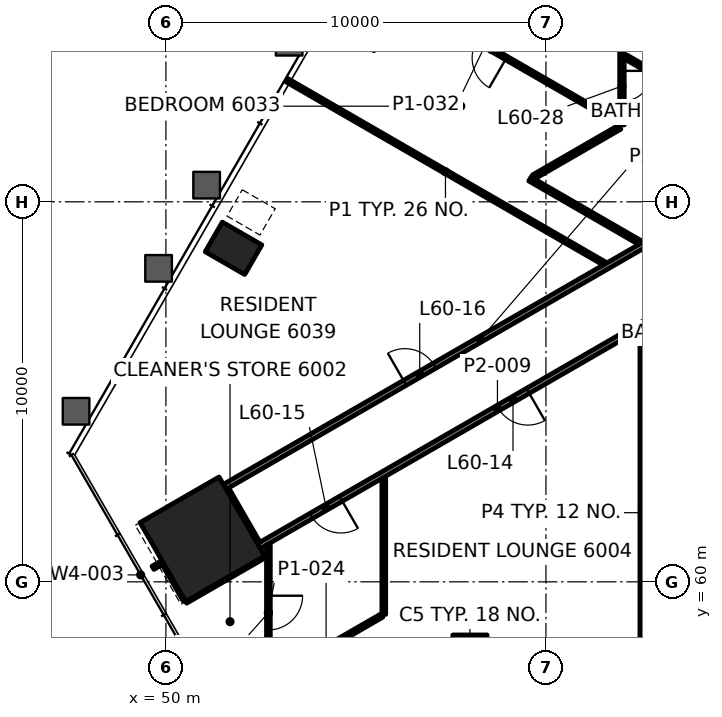
"""IFC4 building model, lengths in metres.
Left out: names, types, materials, properties, quantities, classifications, styles, units other than length and angle.
Written with IfcOpenShell. Run it as: python <this file> out.ifc"""

import sys

from ifc_helpers import new_model, si_unit, direction, frame, frame_2d, origin, origin_2d, place, context, subcontext, project, spatial, rectangle, hollow_rectangle, extrude, element, fill, save


model = new_model("IFC4")
c1 = context("Model", 3, precision=1e-05, world=origin(), true_north=direction((0.0, 1.0)))
c2 = subcontext(c1, "Body", "Model", "MODEL_VIEW")
j1 = project(units=[si_unit("LENGTHUNIT", "METRE"), si_unit("PLANEANGLEUNIT", "RADIAN")], contexts=[c1])
p1 = place(None, origin())
s1 = spatial("IfcSite", under=j1, at=p1, CompositionType="ELEMENT")
p2 = place(p1, origin())
s2 = spatial("IfcBuilding", under=s1, at=p2, CompositionType="ELEMENT")
p3 = place(p2, frame((0.0, 0.0, 256.6)))
s3 = spatial("IfcBuildingStorey", under=s2, at=p3, CompositionType="ELEMENT", Elevation=256.6)
p4 = place(p3, frame((50.959, 61.12, 0.0), z_axis=(0.0, 0.0, 1.0), x_axis=(0.5, -0.866025403784, 0.0)))
e1 = element("IfcColumn", 1, at=p4, inside=s3, PredefinedType="COLUMN", context=c2, shape_type="SweptSolid", body=[
    extrude(rectangle(XDim=2.4, YDim=2.4, at=origin_2d()), origin(), (0.0, 0.0, 1.0), 3.5),
])
for number, where, z_axis, x_axis in (
    (2, (58.0, 58.002, -0.0), (0.0, 0.0, 1.0), (1.0, 0.0, 0.0)),
    (3, (51.78, 68.777, -0.0), (0.0, 0.0, 1.0), (-0.5, -0.866, 0.0)),
):
    element("IfcColumn", number, at=place(p3, frame(where, z_axis=z_axis, x_axis=x_axis)), inside=s3, PredefinedType="COLUMN", context=c2, shape_type="SweptSolid", body=[
        extrude(hollow_rectangle(XDim=0.9, YDim=1.2, WallThickness=0.06, at=origin_2d()), origin(), (0.0, 0.0, 1.0), 3.5),
    ])
p5 = place(p3, frame((52.779, 57.437, 0.0), z_axis=(0.0, 0.0, 1.0), x_axis=(0.866038859646, 0.49997669304, 0.0)))
e4 = element("IfcWall", 4, at=p5, inside=s3, PredefinedType="PARTITIONING", context=c2, shape_type="SweptSolid", body=[
    extrude(rectangle(XDim=3.353, YDim=0.1, at=frame_2d((1.676, 0.0))), origin(), (0.0, 0.0, 1.0), 2.7),
])
p6 = place(p3, frame((50.52, 59.481, 0.0), z_axis=(0.0, 0.0, 1.0), x_axis=(0.866036455013, 0.499980858223, 0.0)))
e5 = element("IfcWall", 5, at=p6, inside=s3, PredefinedType="PARTITIONING", context=c2, shape_type="SweptSolid", body=[
    extrude(rectangle(XDim=2.399, YDim=0.1, at=frame_2d((1.199, 0.0))), origin(), (0.0, 0.0, 1.0), 2.7),
])
p7 = place(p3, frame((65.0, 68.187, 0.0), z_axis=(0.0, 0.0, 1.0), x_axis=(-0.866027660432, -0.499996091351, 0.0)))
e6 = element("IfcWall", 6, at=p7, inside=s3, PredefinedType="PARTITIONING", context=c2, shape_type="SweptSolid", body=[
    extrude(rectangle(XDim=14.494, YDim=0.15, at=frame_2d((7.247, 0.0))), origin(), (0.0, 0.0, 1.0), 2.547),
])
p8 = place(p7, frame((6.324, 0.0, 0.0)))
e7 = element("IfcOpeningElement", 7, at=p8, cuts=e6, PredefinedType="OPENING", context=c2, shape_type="SweptSolid", body=[
    extrude(rectangle(XDim=0.9, YDim=2.1, at=frame_2d((0.45, 1.05))), frame((0.0, 0.085, 0.0), z_axis=(0.0, -1.0, 0.0), x_axis=(1.0, 0.0, 0.0)), (0.0, 0.0, 1.0), 0.17),
])
p9 = place(p7, frame((12.004, 0.0, 0.0)))
e8 = element("IfcOpeningElement", 8, at=p9, cuts=e6, PredefinedType="OPENING", context=c2, shape_type="SweptSolid", body=[
    extrude(rectangle(XDim=0.9, YDim=2.1, at=frame_2d((0.45, 1.05))), frame((0.0, 0.085, 0.0), z_axis=(0.0, -1.0, 0.0), x_axis=(1.0, 0.0, 0.0)), (0.0, 0.0, 1.0), 0.17),
])
p10 = place(p3, frame((49.66, 60.37, 0.0), z_axis=(0.0, 0.0, 1.0), x_axis=(0.866006330792, 0.500033033937, 0.0)))
e9 = element("IfcWall", 9, at=p10, inside=s3, PredefinedType="PARTITIONING", context=c2, shape_type="SweptSolid", body=[
    extrude(rectangle(XDim=0.25, YDim=0.1, at=frame_2d((0.125, 0.0))), origin(), (0.0, 0.0, 1.0), 2.7),
])
p11 = place(p3, frame((51.549, 62.5, 0.0), z_axis=(0.0, 0.0, 1.0), x_axis=(0.866020420161, 0.50000863179, 0.0)))
e10 = element("IfcWall", 10, at=p11, inside=s3, PredefinedType="PARTITIONING", context=c2, shape_type="SweptSolid", body=[
    extrude(rectangle(XDim=15.532, YDim=0.15, at=frame_2d((7.766, 0.0))), origin(), (0.0, 0.0, 1.0), 2.7),
])
p12 = place(p11, frame((5.474, 0.0, 0.0)))
e11 = element("IfcOpeningElement", 11, at=p12, cuts=e10, PredefinedType="OPENING", context=c2, shape_type="SweptSolid", body=[
    extrude(rectangle(XDim=0.9, YDim=2.1, at=frame_2d((0.45, 1.05))), frame((0.0, 0.085, 0.0), z_axis=(0.0, -1.0, 0.0), x_axis=(1.0, 0.0, 0.0)), (0.0, 0.0, 1.0), 0.17),
])
p13 = place(p3, frame((59.673, 70.655, 0.0), z_axis=(0.0, 0.0, 1.0), x_axis=(0.866053563643, 0.499951222523, 0.0)))
e12 = element("IfcWall", 12, at=p13, inside=s3, PredefinedType="PARTITIONING", context=c2, shape_type="SweptSolid", body=[
    extrude(rectangle(XDim=2.617, YDim=0.12, at=frame_2d((1.309, 0.0))), origin(), (0.0, 0.0, 1.0), 2.7),
])
p14 = place(p3, frame((62.533, 57.002, 0.0), z_axis=(0.0, 0.0, 1.0), x_axis=(0.0, 1.0, 0.0)))
e13 = element("IfcWall", 13, at=p14, inside=s3, PredefinedType="PARTITIONING", context=c2, shape_type="SweptSolid", body=[
    extrude(rectangle(XDim=9.634, YDim=0.12, at=frame_2d((4.817, 0.0))), origin(), (0.0, 0.0, 1.0), 2.547),
])
p15 = place(p3, frame((62.0, 85.912, 0.0), z_axis=(0.0, 0.0, 1.0), x_axis=(0.0, -1.0, 0.0)))
e14 = element("IfcWall", 14, at=p15, inside=s3, PredefinedType="PARTITIONING", context=c2, shape_type="SweptSolid", body=[
    extrude(rectangle(XDim=13.888, YDim=0.12, at=frame_2d((6.944, 0.0))), origin(), (0.0, 0.0, 1.0), 2.7),
])
p16 = place(p15, frame((1.224, 0.0, 0.0)))
e15 = element("IfcOpeningElement", 15, at=p16, cuts=e14, PredefinedType="OPENING", context=c2, shape_type="SweptSolid", body=[
    extrude(rectangle(XDim=0.9, YDim=2.1, at=frame_2d((0.45, 1.05))), frame((0.0, 0.07, 0.0), z_axis=(0.0, -1.0, 0.0), x_axis=(1.0, 0.0, 0.0)), (0.0, 0.0, 1.0), 0.14),
])
p17 = place(p15, frame((9.49, 0.0, 0.0)))
e16 = element("IfcOpeningElement", 16, at=p17, cuts=e14, PredefinedType="OPENING", context=c2, shape_type="SweptSolid", body=[
    extrude(rectangle(XDim=0.9, YDim=2.1, at=frame_2d((0.45, 1.05))), frame((0.0, 0.07, 0.0), z_axis=(0.0, -1.0, 0.0), x_axis=(1.0, 0.0, 0.0)), (0.0, 0.0, 1.0), 0.14),
])
p18 = place(p15, frame((12.466, 0.0, 0.0)))
e17 = element("IfcOpeningElement", 17, at=p18, cuts=e14, PredefinedType="OPENING", context=c2, shape_type="SweptSolid", body=[
    extrude(rectangle(XDim=0.8, YDim=2.1, at=frame_2d((0.4, 1.05))), frame((0.0, 0.07, 0.0), z_axis=(0.0, -1.0, 0.0), x_axis=(1.0, 0.0, 0.0)), (0.0, 0.0, 1.0), 0.14),
])
p19 = place(p3, frame((55.733, 59.142, 0.0), z_axis=(0.0, 0.0, 1.0), x_axis=(0.0, 1.0, 0.0)))
e18 = element("IfcWall", 18, at=p19, inside=s3, PredefinedType="PARTITIONING", context=c2, shape_type="SweptSolid", body=[
    extrude(rectangle(XDim=3.578, YDim=0.1, at=frame_2d((1.789, 0.0))), origin(), (0.0, 0.0, 1.0), 2.7),
])
p20 = place(p3, frame((52.697, 60.967, 0.0), z_axis=(0.0, 0.0, 1.0), x_axis=(0.0, -1.0, 0.0)))
e19 = element("IfcWall", 19, at=p20, inside=s3, PredefinedType="PARTITIONING", context=c2, shape_type="SweptSolid", body=[
    extrude(rectangle(XDim=3.565, YDim=0.1, at=frame_2d((1.783, 0.0))), origin(), (0.0, 0.0, 1.0), 2.7),
])
p21 = place(p20, frame((1.333, 0.0, 0.0)))
e20 = element("IfcOpeningElement", 20, at=p21, cuts=e19, PredefinedType="OPENING", context=c2, shape_type="SweptSolid", body=[
    extrude(rectangle(XDim=0.9, YDim=2.1, at=frame_2d((0.45, 1.05))), frame((0.0, 0.06, 0.0), z_axis=(0.0, -1.0, 0.0), x_axis=(1.0, 0.0, 0.0)), (0.0, 0.0, 1.0), 0.12),
])
p22 = place(p3, frame((52.408, 61.01, 0.0), z_axis=(0.0, 0.0, 1.0), x_axis=(-0.499988108725, 0.866032269107, 0.0)))
e21 = element("IfcWall", 21, at=p22, inside=s3, PredefinedType="PARTITIONING", context=c2, shape_type="SweptSolid", body=[
    extrude(rectangle(XDim=1.644, YDim=0.15, at=frame_2d((0.822, 0.0))), origin(), (0.0, 0.0, 1.0), 2.547),
])
p23 = place(p3, frame((50.495, 59.525, 0.0), z_axis=(0.0, 0.0, 1.0), x_axis=(-0.50004744102, 0.865998011966, 0.0)))
e22 = element("IfcWall", 22, at=p23, inside=s3, PredefinedType="PARTITIONING", context=c2, shape_type="SweptSolid", body=[
    extrude(rectangle(XDim=1.149, YDim=0.1, at=frame_2d((0.574, 0.0))), origin(), (0.0, 0.0, 1.0), 2.7),
])
p24 = place(p3, frame((64.89, 72.2, 0.0), z_axis=(0.0, 0.0, 1.0), x_axis=(-0.866033195618, 0.499986503906, 0.0)))
e23 = element("IfcWall", 23, at=p24, inside=s3, PredefinedType="PARTITIONING", context=c2, shape_type="SweptSolid", body=[
    extrude(rectangle(XDim=3.228, YDim=0.12, at=frame_2d((1.614, 0.0))), origin(), (0.0, 0.0, 1.0), 2.7),
])
p25 = place(p3, frame((61.914, 72.076, 0.0), z_axis=(0.0, 0.0, 1.0), x_axis=(-0.866023498866, 0.500003299401, 0.0)))
e24 = element("IfcWall", 24, at=p25, inside=s3, PredefinedType="PARTITIONING", context=c2, shape_type="SweptSolid", body=[
    extrude(rectangle(XDim=8.127, YDim=0.1, at=frame_2d((4.063, 0.0))), origin(), (0.0, 0.0, 1.0), 2.688),
])
p26 = place(p25, frame((3.413, 0.0, 0.0)))
e25 = element("IfcOpeningElement", 25, at=p26, cuts=e24, PredefinedType="OPENING", context=c2, shape_type="SweptSolid", body=[
    extrude(rectangle(XDim=0.9, YDim=2.1, at=frame_2d((0.45, 1.05))), frame((0.0, 0.06, 0.0), z_axis=(0.0, -1.0, 0.0), x_axis=(1.0, 0.0, 0.0)), (0.0, 0.0, 1.0), 0.12),
])
p27 = place(p3, frame((62.469, 68.931, 0.0), z_axis=(0.0, 0.0, 1.0), x_axis=(-0.866033317326, 0.499986293093, 0.0)))
e26 = element("IfcWall", 26, at=p27, inside=s3, PredefinedType="PARTITIONING", context=c2, shape_type="SweptSolid", body=[
    extrude(rectangle(XDim=3.337, YDim=0.12, at=frame_2d((1.669, 0.0))), origin(), (0.0, 0.0, 1.0), 2.7),
])
p28 = place(p3, frame((61.532, 68.38, 0.0), z_axis=(0.0, 0.0, 1.0), x_axis=(-0.866022444854, 0.500005124982, 0.0)))
e27 = element("IfcWall", 27, at=p28, inside=s3, PredefinedType="PARTITIONING", context=c2, shape_type="SweptSolid", body=[
    extrude(rectangle(XDim=9.645, YDim=0.1, at=frame_2d((4.822, 0.0))), origin(), (0.0, 0.0, 1.0), 2.7),
])
p29 = place(p8, origin())
e28 = element("IfcDoor", 28, at=p29, inside=s3, OperationType="SINGLE_SWING_RIGHT", PredefinedType="DOOR", context=c2, shape_type="SweptSolid", body=[
    extrude(rectangle(XDim=0.9, YDim=2.1, at=frame_2d((0.45, 1.05))), frame((0.0, 0.025, 0.0), z_axis=(0.0, -1.0, 0.0), x_axis=(1.0, 0.0, 0.0)), (0.0, 0.0, 1.0), 0.05),
])
fill(e7, e28)
p30 = place(p9, origin())
e29 = element("IfcDoor", 29, at=p30, inside=s3, OperationType="SINGLE_SWING_LEFT", PredefinedType="DOOR", context=c2, shape_type="SweptSolid", body=[
    extrude(rectangle(XDim=0.9, YDim=2.1, at=frame_2d((0.45, 1.05))), frame((0.0, 0.025, 0.0), z_axis=(0.0, -1.0, 0.0), x_axis=(1.0, 0.0, 0.0)), (0.0, 0.0, 1.0), 0.05),
])
fill(e8, e29)
p31 = place(p12, origin())
e30 = element("IfcDoor", 30, at=p31, inside=s3, OperationType="SINGLE_SWING_RIGHT", PredefinedType="DOOR", context=c2, shape_type="SweptSolid", body=[
    extrude(rectangle(XDim=0.9, YDim=2.1, at=frame_2d((0.45, 1.05))), frame((0.0, 0.025, 0.0), z_axis=(0.0, -1.0, 0.0), x_axis=(1.0, 0.0, 0.0)), (0.0, 0.0, 1.0), 0.05),
])
fill(e11, e30)
p32 = place(p18, origin())
e31 = element("IfcDoor", 31, at=p32, inside=s3, OperationType="SINGLE_SWING_RIGHT", PredefinedType="DOOR", context=c2, shape_type="SweptSolid", body=[
    extrude(rectangle(XDim=0.8, YDim=2.1, at=frame_2d((0.4, 1.05))), frame((0.0, 0.025, 0.0), z_axis=(0.0, -1.0, 0.0), x_axis=(1.0, 0.0, 0.0)), (0.0, 0.0, 1.0), 0.05),
])
fill(e17, e31)
p33 = place(p21, origin())
e32 = element("IfcDoor", 32, at=p33, inside=s3, OperationType="SINGLE_SWING_RIGHT", PredefinedType="DOOR", context=c2, shape_type="SweptSolid", body=[
    extrude(rectangle(XDim=0.9, YDim=2.1, at=frame_2d((0.45, 1.05))), frame((0.0, 0.025, 0.0), z_axis=(0.0, -1.0, 0.0), x_axis=(1.0, 0.0, 0.0)), (0.0, 0.0, 1.0), 0.05),
])
fill(e20, e32)
p34 = place(p26, origin())
e33 = element("IfcDoor", 33, at=p34, inside=s3, OperationType="SINGLE_SWING_RIGHT", PredefinedType="DOOR", context=c2, shape_type="SweptSolid", body=[
    extrude(rectangle(XDim=0.9, YDim=2.1, at=frame_2d((0.45, 1.05))), frame((0.0, 0.025, 0.0), z_axis=(0.0, -1.0, 0.0), x_axis=(1.0, 0.0, 0.0)), (0.0, 0.0, 1.0), 0.05),
])
fill(e25, e33)
save(model, sys.argv[1])
